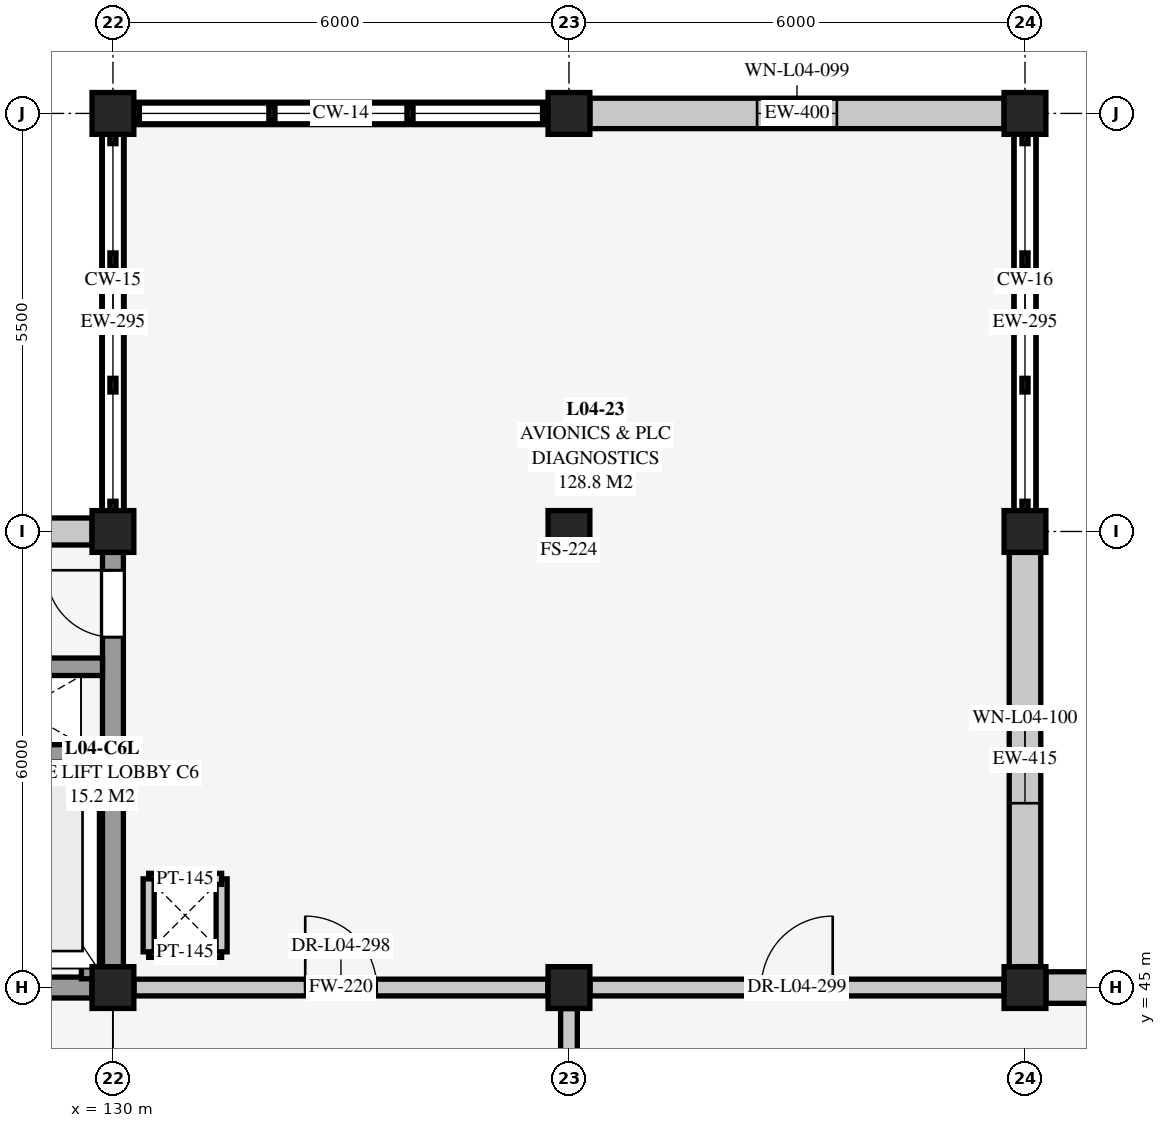
"""IFC4 building model, lengths in metres.
Left out: names, types, materials, properties, quantities, classifications, styles, units other than length and angle.
Written with IfcOpenShell. Run it as: python <this file> out.ifc"""

import sys

from ifc_helpers import new_model, si_unit, direction, frame, frame_2d, origin, origin_2d, place, context, subcontext, project, spatial, rectangle, extrude, element, fill, save


model = new_model("IFC4")
c1 = context("Model", 3, precision=1e-05, world=origin(), true_north=direction((0.0, 1.0)))
c2 = subcontext(c1, "Body", "Model", "MODEL_VIEW")
j1 = project(units=[si_unit("LENGTHUNIT", "METRE"), si_unit("PLANEANGLEUNIT", "RADIAN")], contexts=[c1])
p1 = place(None, origin())
s1 = spatial("IfcSite", under=j1, at=p1, CompositionType="ELEMENT")
p2 = place(p1, origin())
s2 = spatial("IfcBuilding", under=s1, at=p2, CompositionType="ELEMENT")
p3 = place(p2, frame((0.0, 0.0, 13.5)))
s3 = spatial("IfcBuildingStorey", under=s2, at=p3, CompositionType="ELEMENT", Elevation=13.5)
for number, where, z_axis, x_axis in (
    (1, (130.0, 45.0, 0.0), (0.0, 0.0, 1.0), (1.0, 0.0, 0.0)),
    (2, (130.0, 51.0, 0.0), (0.0, 0.0, 1.0), (1.0, 0.0, 0.0)),
    (3, (130.0, 56.5, 0.0), (0.0, 0.0, 1.0), (1.0, 0.0, 0.0)),
    (4, (136.0, 45.0, 0.0), (0.0, 0.0, 1.0), (1.0, 0.0, 0.0)),
    (5, (136.0, 51.0, 0.0), (0.0, 0.0, 1.0), (1.0, 0.0, 0.0)),
    (6, (136.0, 56.5, 0.0), (0.0, 0.0, 1.0), (1.0, 0.0, 0.0)),
    (7, (142.0, 45.0, 0.0), (0.0, 0.0, 1.0), (1.0, 0.0, 0.0)),
    (8, (142.0, 51.0, 0.0), (0.0, 0.0, 1.0), (1.0, 0.0, 0.0)),
    (9, (142.0, 56.5, 0.0), (0.0, 0.0, 1.0), (1.0, 0.0, 0.0)),
):
    element("IfcColumn", number, at=place(p3, frame(where, z_axis=z_axis, x_axis=x_axis)), inside=s3, PredefinedType="COLUMN", context=c2, shape_type="SweptSolid", body=[
        extrude(rectangle(XDim=0.55, YDim=0.55, at=origin_2d()), origin(), (0.0, 0.0, 1.0), 4.5),
    ])
p4 = place(p3, frame((142.275, 45.0, 0.0), z_axis=(0.0, 0.0, 1.0), x_axis=(1.0, 0.0, 0.0)))
e10 = element("IfcWall", 10, at=p4, inside=s3, PredefinedType="SOLIDWALL", context=c2, shape_type="SweptSolid", body=[
    extrude(rectangle(XDim=5.45, YDim=0.415, at=frame_2d((2.725, 0.0))), origin(), (0.0, 0.0, 1.0), 4.093),
])
p5 = place(p4, frame((2.3, 0.0, 0.9)))
e11 = element("IfcOpeningElement", 11, at=p5, cuts=e10, PredefinedType="OPENING", context=c2, shape_type="SweptSolid", body=[
    extrude(rectangle(XDim=0.85, YDim=1.95, at=frame_2d((0.425, 0.975))), frame((0.0, 0.218, 0.0), z_axis=(0.0, -1.0, 0.0), x_axis=(1.0, 0.0, 0.0)), (0.0, 0.0, 1.0), 0.435),
])
p6 = place(p3, frame((124.275, 51.0, 0.0), z_axis=(0.0, 0.0, 1.0), x_axis=(1.0, 0.0, 0.0)))
e12 = element("IfcWall", 12, at=p6, inside=s3, PredefinedType="SOLIDWALL", context=c2, shape_type="SweptSolid", body=[
    extrude(rectangle(XDim=5.45, YDim=0.355, at=frame_2d((2.725, 0.0))), origin(), (0.0, 0.0, 1.0), 4.093),
])
p7 = place(p3, frame((130.275, 56.5, 0.0), z_axis=(0.0, 0.0, 1.0), x_axis=(1.0, 0.0, 0.0)))
e13 = element("IfcWall", 13, at=p7, inside=s3, PredefinedType="SOLIDWALL", context=c2, shape_type="SweptSolid", body=[
    extrude(rectangle(XDim=5.45, YDim=0.295, at=frame_2d((2.725, 0.0))), origin(), (0.0, 0.0, 1.0), 0.41),
])
p8 = place(p3, frame((136.275, 56.5, 0.0), z_axis=(0.0, 0.0, 1.0), x_axis=(1.0, 0.0, 0.0)))
e14 = element("IfcWall", 14, at=p8, inside=s3, PredefinedType="SOLIDWALL", context=c2, shape_type="SweptSolid", body=[
    extrude(rectangle(XDim=5.45, YDim=0.4, at=frame_2d((2.725, 0.0))), origin(), (0.0, 0.0, 1.0), 4.093),
])
p9 = place(p8, frame((2.2, 0.0, 0.85)))
e15 = element("IfcOpeningElement", 15, at=p9, cuts=e14, PredefinedType="OPENING", context=c2, shape_type="SweptSolid", body=[
    extrude(rectangle(XDim=1.05, YDim=2.05, at=frame_2d((0.525, 1.025))), frame((0.0, 0.21, 0.0), z_axis=(0.0, -1.0, 0.0), x_axis=(1.0, 0.0, 0.0)), (0.0, 0.0, 1.0), 0.42),
])
p10 = place(p3, frame((142.0, 50.725, 0.0), z_axis=(0.0, 0.0, 1.0), x_axis=(0.0, -1.0, 0.0)))
e16 = element("IfcWall", 16, at=p10, inside=s3, PredefinedType="SOLIDWALL", context=c2, shape_type="SweptSolid", body=[
    extrude(rectangle(XDim=5.45, YDim=0.415, at=frame_2d((2.725, 0.0))), origin(), (0.0, 0.0, 1.0), 4.093),
])
p11 = place(p10, frame((2.15, 0.0, 0.85)))
e17 = element("IfcOpeningElement", 17, at=p11, cuts=e16, PredefinedType="OPENING", context=c2, shape_type="SweptSolid", body=[
    extrude(rectangle(XDim=1.15, YDim=2.05, at=frame_2d((0.575, 1.025))), frame((0.0, 0.218, 0.0), z_axis=(0.0, -1.0, 0.0), x_axis=(1.0, 0.0, 0.0)), (0.0, 0.0, 1.0), 0.435),
])
p12 = place(p3, frame((130.0, 51.275, 0.0), z_axis=(0.0, 0.0, 1.0), x_axis=(0.0, 1.0, 0.0)))
e18 = element("IfcWall", 18, at=p12, inside=s3, PredefinedType="SOLIDWALL", context=c2, shape_type="SweptSolid", body=[
    extrude(rectangle(XDim=4.95, YDim=0.295, at=frame_2d((2.475, 0.0))), origin(), (0.0, 0.0, 1.0), 0.46),
])
p13 = place(p3, frame((142.0, 56.225, 0.0), z_axis=(0.0, 0.0, 1.0), x_axis=(0.0, -1.0, 0.0)))
e19 = element("IfcWall", 19, at=p13, inside=s3, PredefinedType="SOLIDWALL", context=c2, shape_type="SweptSolid", body=[
    extrude(rectangle(XDim=4.95, YDim=0.295, at=frame_2d((2.475, 0.0))), origin(), (0.0, 0.0, 1.0), 0.52),
])
for number, where, z_axis, x_axis in (
    (20, (130.47, 45.47, 0.0), (0.0, 0.0, 1.0), (1.0, 0.0, 0.0)),
    (21, (131.43, 45.47, 0.0), (0.0, 0.0, 1.0), (0.0, 1.0, 0.0)),
    (22, (131.43, 46.43, 0.0), (0.0, 0.0, 1.0), (-1.0, 0.0, 0.0)),
    (23, (130.47, 46.43, 0.0), (0.0, 0.0, 1.0), (0.0, -1.0, 0.0)),
):
    element("IfcWall", number, at=place(p3, frame(where, z_axis=z_axis, x_axis=x_axis)), inside=s3, PredefinedType="PARTITIONING", context=c2, shape_type="SweptSolid", body=[
        extrude(rectangle(XDim=0.96, YDim=0.145, at=frame_2d((0.48, 0.0))), origin(), (0.0, 0.0, 1.0), 4.24),
    ])
p14 = place(p3, frame((127.88, 45.42, 4.5), z_axis=(0.0, 0.0, 1.0), x_axis=(1.0, 0.0, 0.0)))
e24 = element("IfcWall", 24, at=p14, inside=s3, PredefinedType="SHEAR", context=c2, shape_type="SweptSolid", body=[
    extrude(rectangle(XDim=1.82, YDim=0.23, at=frame_2d((0.91, 0.0))), origin(), (0.0, 0.0, 1.0), 1.0),
])
p15 = place(p3, frame((129.7, 45.42, 4.5), z_axis=(0.0, 0.0, 1.0), x_axis=(0.0, 1.0, 0.0)))
e25 = element("IfcWall", 25, at=p15, inside=s3, PredefinedType="SHEAR", context=c2, shape_type="SweptSolid", body=[
    extrude(rectangle(XDim=2.66, YDim=0.23, at=frame_2d((1.33, 0.0))), origin(), (0.0, 0.0, 1.0), 1.0),
])
p16 = place(p3, frame((129.7, 48.08, 4.5), z_axis=(0.0, 0.0, 1.0), x_axis=(-1.0, 0.0, 0.0)))
e26 = element("IfcWall", 26, at=p16, inside=s3, PredefinedType="SHEAR", context=c2, shape_type="SweptSolid", body=[
    extrude(rectangle(XDim=1.82, YDim=0.23, at=frame_2d((0.91, 0.0))), origin(), (0.0, 0.0, 1.0), 1.0),
])
p17 = place(p3, frame((124.275, 45.0, 0.0), z_axis=(0.0, 0.0, 1.0), x_axis=(1.0, 0.0, 0.0)))
e27 = element("IfcWall", 27, at=p17, inside=s3, PredefinedType="SHEAR", context=c2, shape_type="SweptSolid", body=[
    extrude(rectangle(XDim=5.45, YDim=0.275, at=frame_2d((2.725, 0.0))), origin(), (0.0, 0.0, 1.0), 4.24),
])
p18 = place(p17, frame((1.385, 0.0, 0.0)))
e28 = element("IfcOpeningElement", 28, at=p18, cuts=e27, PredefinedType="OPENING", context=c2, shape_type="SweptSolid", body=[
    extrude(rectangle(XDim=1.38, YDim=2.16, at=frame_2d((0.69, 1.08))), frame((0.0, 0.147, 0.0), z_axis=(0.0, -1.0, 0.0), x_axis=(1.0, 0.0, 0.0)), (0.0, 0.0, 1.0), 0.295),
])
p19 = place(p3, frame((130.0, 45.275, 0.0), z_axis=(0.0, 0.0, 1.0), x_axis=(0.0, 1.0, 0.0)))
e29 = element("IfcWall", 29, at=p19, inside=s3, PredefinedType="SHEAR", context=c2, shape_type="SweptSolid", body=[
    extrude(rectangle(XDim=5.45, YDim=0.275, at=frame_2d((2.725, 0.0))), origin(), (0.0, 0.0, 1.0), 4.24),
])
p20 = place(p19, frame((4.335, 0.0, 0.0)))
e30 = element("IfcOpeningElement", 30, at=p20, cuts=e29, PredefinedType="OPENING", context=c2, shape_type="SweptSolid", body=[
    extrude(rectangle(XDim=0.88, YDim=2.08, at=frame_2d((0.44, 1.04))), frame((0.0, 0.147, 0.0), z_axis=(0.0, -1.0, 0.0), x_axis=(1.0, 0.0, 0.0)), (0.0, 0.0, 1.0), 0.295),
])
p21 = place(p3, frame((128.005, 45.42, 0.0), z_axis=(0.0, 0.0, 1.0), x_axis=(1.0, 0.0, 0.0)))
e31 = element("IfcWall", 31, at=p21, inside=s3, PredefinedType="SHEAR", context=c2, shape_type="SweptSolid", body=[
    extrude(rectangle(XDim=1.58, YDim=0.23, at=frame_2d((0.79, 0.0))), origin(), (0.0, 0.0, 1.0), 4.5),
])
p22 = place(p3, frame((129.7, 45.115, 0.0), z_axis=(0.0, 0.0, 1.0), x_axis=(0.0, 1.0, 0.0)))
e32 = element("IfcWall", 32, at=p22, inside=s3, PredefinedType="SHEAR", context=c2, shape_type="SweptSolid", body=[
    extrude(rectangle(XDim=2.965, YDim=0.23, at=frame_2d((1.482, 0.0))), origin(), (0.0, 0.0, 1.0), 4.5),
])
p23 = place(p3, frame((128.005, 48.08, 0.0), z_axis=(0.0, 0.0, 1.0), x_axis=(1.0, 0.0, 0.0)))
e33 = element("IfcWall", 33, at=p23, inside=s3, PredefinedType="SHEAR", context=c2, shape_type="SweptSolid", body=[
    extrude(rectangle(XDim=1.58, YDim=0.23, at=frame_2d((0.79, 0.0))), origin(), (0.0, 0.0, 1.0), 4.5),
])
p24 = place(p3, frame((128.005, 49.22, 0.0), z_axis=(0.0, 0.0, 1.0), x_axis=(1.0, 0.0, 0.0)))
e34 = element("IfcWall", 34, at=p24, inside=s3, PredefinedType="SHEAR", context=c2, shape_type="SweptSolid", body=[
    extrude(rectangle(XDim=1.858, YDim=0.23, at=frame_2d((0.929, 0.0))), origin(), (0.0, 0.0, 1.0), 4.24),
])
p25 = place(p3, frame((136.0, 33.277, 0.0), z_axis=(0.0, 0.0, 1.0), x_axis=(0.0, 1.0, 0.0)))
e35 = element("IfcWall", 35, at=p25, inside=s3, PredefinedType="SOLIDWALL", context=c2, shape_type="SweptSolid", body=[
    extrude(rectangle(XDim=11.446, YDim=0.22, at=frame_2d((5.723, 0.0))), origin(), (0.0, 0.0, 1.0), 3.883),
])
p26 = place(p25, frame((5.253, 0.0, 0.0)))
e36 = element("IfcOpeningElement", 36, at=p26, cuts=e35, PredefinedType="OPENING", context=c2, shape_type="SweptSolid", body=[
    extrude(rectangle(XDim=0.94, YDim=2.1, at=frame_2d((0.47, 1.05))), frame((0.0, 0.12, 0.0), z_axis=(0.0, -1.0, 0.0), x_axis=(1.0, 0.0, 0.0)), (0.0, 0.0, 1.0), 0.24),
])
p27 = place(p3, frame((130.277, 45.0, 0.0), z_axis=(0.0, 0.0, 1.0), x_axis=(1.0, 0.0, 0.0)))
e37 = element("IfcWall", 37, at=p27, inside=s3, PredefinedType="SOLIDWALL", context=c2, shape_type="SweptSolid", body=[
    extrude(rectangle(XDim=5.446, YDim=0.22, at=frame_2d((2.723, 0.0))), origin(), (0.0, 0.0, 1.0), 4.146),
])
p28 = place(p27, frame((2.253, 0.0, 0.0)))
e38 = element("IfcOpeningElement", 38, at=p28, cuts=e37, PredefinedType="OPENING", context=c2, shape_type="SweptSolid", body=[
    extrude(rectangle(XDim=0.94, YDim=2.1, at=frame_2d((0.47, 1.05))), frame((0.0, 0.12, 0.0), z_axis=(0.0, -1.0, 0.0), x_axis=(1.0, 0.0, 0.0)), (0.0, 0.0, 1.0), 0.24),
])
p29 = place(p3, frame((136.277, 45.0, 0.0), z_axis=(0.0, 0.0, 1.0), x_axis=(1.0, 0.0, 0.0)))
e39 = element("IfcWall", 39, at=p29, inside=s3, PredefinedType="SOLIDWALL", context=c2, shape_type="SweptSolid", body=[
    extrude(rectangle(XDim=5.446, YDim=0.22, at=frame_2d((2.723, 0.0))), origin(), (0.0, 0.0, 1.0), 4.24),
])
p30 = place(p29, frame((2.253, 0.0, 0.0)))
e40 = element("IfcOpeningElement", 40, at=p30, cuts=e39, PredefinedType="OPENING", context=c2, shape_type="SweptSolid", body=[
    extrude(rectangle(XDim=0.94, YDim=2.1, at=frame_2d((0.47, 1.05))), frame((0.0, 0.12, 0.0), z_axis=(0.0, -1.0, 0.0), x_axis=(1.0, 0.0, 0.0)), (0.0, 0.0, 1.0), 0.24),
])
p31 = place(p9, origin())
e41 = element("IfcWindow", 41, at=p31, inside=s3, PartitioningType="SINGLE_PANEL", PredefinedType="WINDOW", context=c2, shape_type="SweptSolid", body=[
    extrude(rectangle(XDim=1.05, YDim=2.05, at=frame_2d((0.525, 1.025))), frame((0.0, 0.03, 0.0), z_axis=(0.0, -1.0, 0.0), x_axis=(1.0, 0.0, 0.0)), (0.0, 0.0, 1.0), 0.06),
])
fill(e15, e41)
p32 = place(p11, origin())
e42 = element("IfcWindow", 42, at=p32, inside=s3, PartitioningType="SINGLE_PANEL", PredefinedType="WINDOW", context=c2, shape_type="SweptSolid", body=[
    extrude(rectangle(XDim=1.15, YDim=2.05, at=frame_2d((0.575, 1.025))), frame((0.0, 0.03, 0.0), z_axis=(0.0, -1.0, 0.0), x_axis=(1.0, 0.0, 0.0)), (0.0, 0.0, 1.0), 0.06),
])
fill(e17, e42)
p33 = place(p20, origin())
e43 = element("IfcDoor", 43, at=p33, inside=s3, OperationType="SINGLE_SWING_RIGHT", PredefinedType="DOOR", context=c2, shape_type="SweptSolid", body=[
    extrude(rectangle(XDim=0.88, YDim=2.08, at=frame_2d((0.44, 1.04))), frame((0.0, 0.025, 0.0), z_axis=(0.0, -1.0, 0.0), x_axis=(1.0, 0.0, 0.0)), (0.0, 0.0, 1.0), 0.05),
])
fill(e30, e43)
p34 = place(p28, origin())
e44 = element("IfcDoor", 44, at=p34, inside=s3, OperationType="SINGLE_SWING_LEFT", PredefinedType="DOOR", context=c2, shape_type="SweptSolid", body=[
    extrude(rectangle(XDim=0.94, YDim=2.1, at=frame_2d((0.47, 1.05))), frame((0.0, 0.025, 0.0), z_axis=(0.0, -1.0, 0.0), x_axis=(1.0, 0.0, 0.0)), (0.0, 0.0, 1.0), 0.05),
])
fill(e38, e44)
p35 = place(p30, origin())
e45 = element("IfcDoor", 45, at=p35, inside=s3, OperationType="SINGLE_SWING_RIGHT", PredefinedType="DOOR", context=c2, shape_type="SweptSolid", body=[
    extrude(rectangle(XDim=0.94, YDim=2.1, at=frame_2d((0.47, 1.05))), frame((0.0, 0.025, 0.0), z_axis=(0.0, -1.0, 0.0), x_axis=(1.0, 0.0, 0.0)), (0.0, 0.0, 1.0), 0.05),
])
fill(e40, e45)
save(model, sys.argv[1])
